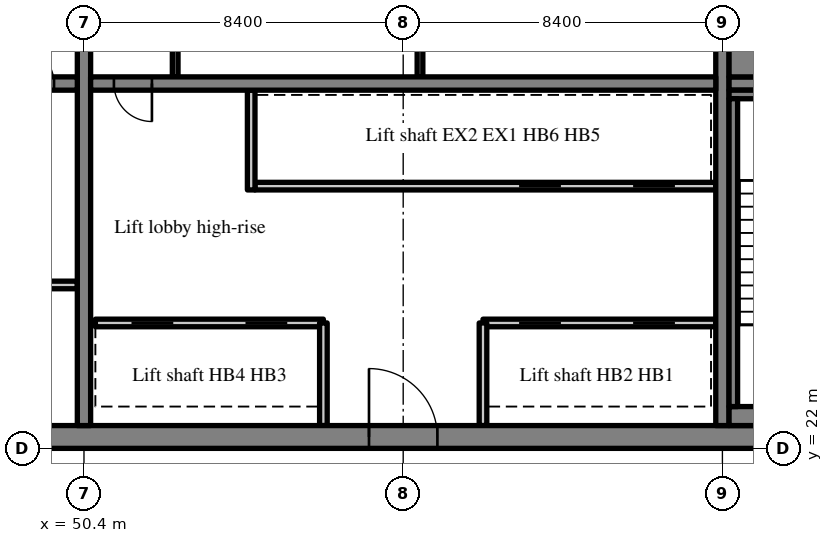
"""IFC4 building model, lengths in metres.
Left out: names, types, materials, properties, quantities, classifications, styles, units other than length and angle.
Written with IfcOpenShell. Run it as: python <this file> out.ifc"""

import sys

from ifc_helpers import new_model, si_unit, direction, frame, frame_2d, origin, place, context, subcontext, project, spatial, rectangle, extrude, source, transform, mapped, element, fill, save


model = new_model("IFC4")
c1 = context("Model", 3, precision=1e-05, world=origin(), true_north=direction((0.0, 1.0)))
c2 = subcontext(c1, "Body", "Model", "MODEL_VIEW")
j1 = project(units=[si_unit("LENGTHUNIT", "METRE"), si_unit("PLANEANGLEUNIT", "RADIAN")], contexts=[c1])
p1 = place(None, origin())
s1 = spatial("IfcSite", under=j1, at=p1, CompositionType="ELEMENT")
p2 = place(p1, origin())
s2 = spatial("IfcBuilding", under=s1, at=p2, CompositionType="ELEMENT")
p3 = place(p2, frame((0.0, 0.0, 253.0)))
s3 = spatial("IfcBuildingStorey", under=s2, at=p3, CompositionType="ELEMENT", Elevation=253.0)
m1 = source(origin(), c2, "Body", "SweptSolid", [
    extrude(rectangle(XDim=50.4, YDim=0.6, at=frame_2d((25.2, 0.0))), origin(), (0.0, 0.0, 1.0), 3.62),
])
p4 = place(p3, frame((25.2, 22.3, 0.0), z_axis=(0.0, 0.0, 1.0), x_axis=(1.0, 0.0, 0.0)))
e1 = element("IfcWall", 1, at=p4, inside=s3, PredefinedType="SHEAR", context=c2, shape_type="MappedRepresentation", body=[
    mapped(m1, transform((0.0, 0.0, 0.0), scale=1.0)),
])
m2 = source(origin(), c2, "Body", "SweptSolid", [
    extrude(rectangle(XDim=1.8, YDim=2.1, at=frame_2d((0.9, 1.05))), frame((0.0, 0.31, 0.0), z_axis=(0.0, -1.0, 0.0), x_axis=(1.0, 0.0, 0.0)), (0.0, 0.0, 1.0), 0.62),
])
p5 = place(p4, frame((15.9, 0.0, 0.0)))
e2 = element("IfcOpeningElement", 2, at=p5, cuts=e1, PredefinedType="OPENING", context=c2, shape_type="MappedRepresentation", body=[
    mapped(m2, transform((0.0, 0.0, 0.0), scale=1.0)),
])
m3 = source(origin(), c2, "Body", "SweptSolid", [
    extrude(rectangle(XDim=0.9, YDim=2.1, at=frame_2d((0.45, 1.05))), frame((0.0, 0.31, 0.0), z_axis=(0.0, -1.0, 0.0), x_axis=(1.0, 0.0, 0.0)), (0.0, 0.0, 1.0), 0.62),
])
p6 = place(p4, frame((21.513, 0.0, 0.0)))
e3 = element("IfcOpeningElement", 3, at=p6, cuts=e1, PredefinedType="OPENING", context=c2, shape_type="MappedRepresentation", body=[
    mapped(m3, transform((0.0, 0.0, 0.0), scale=1.0)),
])
p7 = place(p4, frame((32.7, 0.0, 0.0)))
e4 = element("IfcOpeningElement", 4, at=p7, cuts=e1, PredefinedType="OPENING", context=c2, shape_type="MappedRepresentation", body=[
    mapped(m2, transform((0.0, 0.0, 0.0), scale=1.0)),
])
m4 = source(origin(), c2, "Body", "SweptSolid", [
    extrude(rectangle(XDim=1.2, YDim=2.1, at=frame_2d((0.6, 1.05))), frame((0.0, 0.31, 0.0), z_axis=(0.0, -1.0, 0.0), x_axis=(1.0, 0.0, 0.0)), (0.0, 0.0, 1.0), 0.62),
])
p8 = place(p4, frame((6.488, 0.0, 0.0)))
e5 = element("IfcOpeningElement", 5, at=p8, cuts=e1, PredefinedType="OPENING", context=c2, shape_type="MappedRepresentation", body=[
    mapped(m4, transform((0.0, 0.0, 0.0), scale=1.0)),
])
p9 = place(p4, frame((47.925, 0.0, 0.0)))
e6 = element("IfcOpeningElement", 6, at=p9, cuts=e1, PredefinedType="OPENING", context=c2, shape_type="MappedRepresentation", body=[
    mapped(m4, transform((0.0, 0.0, 0.0), scale=1.0)),
])
m5 = source(origin(), c2, "Body", "SweptSolid", [
    extrude(rectangle(XDim=18.8, YDim=0.35, at=frame_2d((9.4, 0.0))), origin(), (0.0, 0.0, 1.0), 3.62),
])
p10 = place(p3, frame((50.4, 22.6, 0.0), z_axis=(0.0, 0.0, 1.0), x_axis=(0.0, 1.0, 0.0)))
e7 = element("IfcWall", 7, at=p10, inside=s3, PredefinedType="SHEAR", context=c2, shape_type="MappedRepresentation", body=[
    mapped(m5, transform((0.0, 0.0, 0.0), scale=1.0)),
])
m6 = source(origin(), c2, "Body", "SweptSolid", [
    extrude(rectangle(XDim=1.1, YDim=2.1, at=frame_2d((0.55, 1.05))), frame((0.0, 0.185, 0.0), z_axis=(0.0, -1.0, 0.0), x_axis=(1.0, 0.0, 0.0)), (0.0, 0.0, 1.0), 0.37),
])
p11 = place(p10, frame((12.85, 0.0, 0.0)))
e8 = element("IfcOpeningElement", 8, at=p11, cuts=e7, PredefinedType="OPENING", context=c2, shape_type="MappedRepresentation", body=[
    mapped(m6, transform((0.0, 0.0, 0.0), scale=1.0)),
])
p12 = place(p3, frame((67.2, 22.6, 0.0), z_axis=(0.0, 0.0, 1.0), x_axis=(0.0, 1.0, 0.0)))
e9 = element("IfcWall", 9, at=p12, inside=s3, PredefinedType="SHEAR", context=c2, shape_type="MappedRepresentation", body=[
    mapped(m5, transform((0.0, 0.0, 0.0), scale=1.0)),
])
m7 = source(origin(), c2, "Body", "SweptSolid", [
    extrude(rectangle(XDim=16.45, YDim=0.35, at=frame_2d((8.225, 0.0))), origin(), (0.0, 0.0, 1.0), 3.62),
])
p13 = place(p3, frame((33.775, 31.6, 0.0), z_axis=(0.0, 0.0, 1.0), x_axis=(1.0, 0.0, 0.0)))
e10 = element("IfcWall", 10, at=p13, inside=s3, PredefinedType="SHEAR", context=c2, shape_type="MappedRepresentation", body=[
    mapped(m7, transform((0.0, 0.0, 0.0), scale=1.0)),
])
m8 = source(origin(), c2, "Body", "SweptSolid", [
    extrude(rectangle(XDim=1.0, YDim=2.1, at=frame_2d((0.5, 1.05))), frame((0.0, 0.185, 0.0), z_axis=(0.0, -1.0, 0.0), x_axis=(1.0, 0.0, 0.0)), (0.0, 0.0, 1.0), 0.37),
])
p14 = place(p13, frame((14.837, 0.0, 0.0)))
e11 = element("IfcOpeningElement", 11, at=p14, cuts=e10, PredefinedType="OPENING", context=c2, shape_type="MappedRepresentation", body=[
    mapped(m8, transform((0.0, 0.0, 0.0), scale=1.0)),
])
m9 = source(origin(), c2, "Body", "SweptSolid", [
    extrude(rectangle(XDim=16.45, YDim=0.35, at=frame_2d((8.225, 0.0))), origin(), (0.0, 0.0, 1.0), 3.62),
])
p15 = place(p3, frame((50.575, 31.6, 0.0), z_axis=(0.0, 0.0, 1.0), x_axis=(1.0, 0.0, 0.0)))
e12 = element("IfcWall", 12, at=p15, inside=s3, PredefinedType="SHEAR", context=c2, shape_type="MappedRepresentation", body=[
    mapped(m9, transform((0.0, 0.0, 0.0), scale=1.0)),
])
p16 = place(p15, frame((0.613, 0.0, 0.0)))
e13 = element("IfcOpeningElement", 13, at=p16, cuts=e12, PredefinedType="OPENING", context=c2, shape_type="MappedRepresentation", body=[
    mapped(m8, transform((0.0, 0.0, 0.0), scale=1.0)),
])
m10 = source(origin(), c2, "Body", "SweptSolid", [
    extrude(rectangle(XDim=7.625, YDim=0.35, at=frame_2d((3.812, 0.0))), origin(), (0.0, 0.0, 1.0), 3.62),
])
p17 = place(p3, frame((67.375, 31.6, 0.0), z_axis=(0.0, 0.0, 1.0), x_axis=(1.0, 0.0, 0.0)))
e14 = element("IfcWall", 14, at=p17, inside=s3, PredefinedType="SHEAR", context=c2, shape_type="MappedRepresentation", body=[
    mapped(m10, transform((0.0, 0.0, 0.0), scale=1.0)),
])
p18 = place(p17, frame((5.8, 0.0, 0.0)))
e15 = element("IfcOpeningElement", 15, at=p18, cuts=e14, PredefinedType="OPENING", context=c2, shape_type="MappedRepresentation", body=[
    mapped(m6, transform((0.0, 0.0, 0.0), scale=1.0)),
])
m11 = source(origin(), c2, "Body", "SweptSolid", [
    extrude(rectangle(XDim=6.125, YDim=0.2, at=frame_2d((3.062, 0.0))), origin(), (0.0, 0.0, 1.0), 3.62),
])
p19 = place(p3, frame((44.1, 26.3, 0.0), z_axis=(0.0, 0.0, 1.0), x_axis=(1.0, 0.0, 0.0)))
e16 = element("IfcWall", 16, at=p19, inside=s3, PredefinedType="PARTITIONING", context=c2, shape_type="MappedRepresentation", body=[
    mapped(m11, transform((0.0, 0.0, 0.0), scale=1.0)),
])
p20 = place(p3, frame((67.025, 25.3, 0.0), z_axis=(0.0, 0.0, 1.0), x_axis=(-1.0, 0.0, 0.0)))
e17 = element("IfcWall", 17, at=p20, inside=s3, PredefinedType="SOLIDWALL", context=c2, shape_type="MappedRepresentation", body=[
    mapped(m11, transform((0.0, 0.0, 0.0), scale=1.0)),
])
m12 = source(origin(), c2, "Body", "SweptSolid", [
    extrude(rectangle(XDim=1.1, YDim=2.1, at=frame_2d((0.55, 1.05))), frame((0.0, 0.11, 0.0), z_axis=(0.0, -1.0, 0.0), x_axis=(1.0, 0.0, 0.0)), (0.0, 0.0, 1.0), 0.22),
])
p21 = place(p20, frame((1.075, 0.0, 0.0)))
e18 = element("IfcOpeningElement", 18, at=p21, cuts=e17, PredefinedType="OPENING", context=c2, shape_type="MappedRepresentation", body=[
    mapped(m12, transform((0.0, 0.0, 0.0), scale=1.0)),
])
p22 = place(p20, frame((4.075, 0.0, 0.0)))
e19 = element("IfcOpeningElement", 19, at=p22, cuts=e17, PredefinedType="OPENING", context=c2, shape_type="MappedRepresentation", body=[
    mapped(m12, transform((0.0, 0.0, 0.0), scale=1.0)),
])
m13 = source(origin(), c2, "Body", "SweptSolid", [
    extrude(rectangle(XDim=6.0, YDim=0.2, at=frame_2d((3.0, 0.0))), origin(), (0.0, 0.0, 1.0), 3.62),
])
p23 = place(p3, frame((56.7, 25.3, 0.0), z_axis=(0.0, 0.0, 1.0), x_axis=(-1.0, 0.0, 0.0)))
e20 = element("IfcWall", 20, at=p23, inside=s3, PredefinedType="SOLIDWALL", context=c2, shape_type="MappedRepresentation", body=[
    mapped(m13, transform((0.0, 0.0, 0.0), scale=1.0)),
])
p24 = place(p23, frame((0.95, 0.0, 0.0)))
e21 = element("IfcOpeningElement", 21, at=p24, cuts=e20, PredefinedType="OPENING", context=c2, shape_type="MappedRepresentation", body=[
    mapped(m12, transform((0.0, 0.0, 0.0), scale=1.0)),
])
p25 = place(p23, frame((3.95, 0.0, 0.0)))
e22 = element("IfcOpeningElement", 22, at=p25, cuts=e20, PredefinedType="OPENING", context=c2, shape_type="MappedRepresentation", body=[
    mapped(m12, transform((0.0, 0.0, 0.0), scale=1.0)),
])
m14 = source(origin(), c2, "Body", "SweptSolid", [
    extrude(rectangle(XDim=12.125, YDim=0.2, at=frame_2d((6.062, 0.0))), origin(), (0.0, 0.0, 1.0), 3.62),
])
p26 = place(p3, frame((67.025, 28.9, 0.0), z_axis=(0.0, 0.0, 1.0), x_axis=(-1.0, 0.0, 0.0)))
e23 = element("IfcWall", 23, at=p26, inside=s3, PredefinedType="SOLIDWALL", context=c2, shape_type="MappedRepresentation", body=[
    mapped(m14, transform((0.0, 0.0, 0.0), scale=1.0)),
])
p27 = place(p26, frame((1.075, 0.0, 0.0)))
e24 = element("IfcOpeningElement", 24, at=p27, cuts=e23, PredefinedType="OPENING", context=c2, shape_type="MappedRepresentation", body=[
    mapped(m12, transform((0.0, 0.0, 0.0), scale=1.0)),
])
p28 = place(p26, frame((4.075, 0.0, 0.0)))
e25 = element("IfcOpeningElement", 25, at=p28, cuts=e23, PredefinedType="OPENING", context=c2, shape_type="MappedRepresentation", body=[
    mapped(m12, transform((0.0, 0.0, 0.0), scale=1.0)),
])
m15 = source(origin(), c2, "Body", "SweptSolid", [
    extrude(rectangle(XDim=2.7, YDim=0.2, at=frame_2d((1.35, 0.0))), origin(), (0.0, 0.0, 1.0), 3.62),
])
for number, where, z_axis, x_axis in (
    (26, (60.9, 22.6, 0.0), (0.0, 0.0, 1.0), (0.0, 1.0, 0.0)),
    (27, (56.7, 22.6, 0.0), (0.0, 0.0, 1.0), (0.0, 1.0, 0.0)),
):
    element("IfcWall", number, at=place(p3, frame(where, z_axis=z_axis, x_axis=x_axis)), inside=s3, PredefinedType="SOLIDWALL", context=c2, shape_type="MappedRepresentation", body=[
        mapped(m15, transform((0.0, 0.0, 0.0), scale=1.0)),
    ])
m16 = source(origin(), c2, "Body", "SweptSolid", [
    extrude(rectangle(XDim=2.625, YDim=0.2, at=frame_2d((1.312, 0.0))), origin(), (0.0, 0.0, 1.0), 3.62),
])
p29 = place(p3, frame((54.8, 28.8, 0.0), z_axis=(0.0, 0.0, 1.0), x_axis=(0.0, 1.0, 0.0)))
e28 = element("IfcWall", 28, at=p29, inside=s3, PredefinedType="SOLIDWALL", context=c2, shape_type="MappedRepresentation", body=[
    mapped(m16, transform((0.0, 0.0, 0.0), scale=1.0)),
])
m17 = source(origin(), c2, "Body", "SweptSolid", [
    extrude(rectangle(XDim=3.225, YDim=0.15, at=frame_2d((1.613, 0.0))), origin(), (0.0, 0.0, 1.0), 3.62),
])
for number, where, z_axis, x_axis in (
    (29, (52.8, 31.775, 0.0), (0.0, 0.0, 1.0), (0.0, 1.0, 0.0)),
    (30, (59.242, 31.775, 0.0), (0.0, 0.0, 1.0), (0.0, 1.0, 0.0)),
):
    element("IfcWall", number, at=place(p3, frame(where, z_axis=z_axis, x_axis=x_axis)), inside=s3, PredefinedType="PARTITIONING", context=c2, shape_type="MappedRepresentation", body=[
        mapped(m17, transform((0.0, 0.0, 0.0), scale=1.0)),
    ])
m18 = source(origin(), c2, "Body", "SweptSolid", [
    extrude(rectangle(XDim=4.875, YDim=0.5, at=frame_2d((2.438, 0.0))), origin(), (0.0, 0.0, 1.0), 3.62),
])
p30 = place(p3, frame((67.375, 22.85, 0.0), z_axis=(0.0, 0.0, 1.0), x_axis=(1.0, 0.0, 0.0)))
e31 = element("IfcWall", 31, at=p30, inside=s3, PredefinedType="SOLIDWALL", context=c2, shape_type="MappedRepresentation", body=[
    mapped(m18, transform((0.0, 0.0, 0.0), scale=1.0)),
])
m19 = source(origin(), c2, "Body", "SweptSolid", [
    extrude(rectangle(XDim=4.875, YDim=0.225, at=frame_2d((2.438, 0.0))), origin(), (0.0, 0.0, 1.0), 3.62),
])
p31 = place(p3, frame((67.375, 31.312, 0.0), z_axis=(0.0, 0.0, 1.0), x_axis=(1.0, 0.0, 0.0)))
e32 = element("IfcWall", 32, at=p31, inside=s3, PredefinedType="SOLIDWALL", context=c2, shape_type="MappedRepresentation", body=[
    mapped(m19, transform((0.0, 0.0, 0.0), scale=1.0)),
])
m20 = source(origin(), c2, "Body", "SweptSolid", [
    extrude(rectangle(XDim=8.1, YDim=0.225, at=frame_2d((4.05, 0.0))), origin(), (0.0, 0.0, 1.0), 3.62),
])
p32 = place(p3, frame((67.487, 23.1, 0.0), z_axis=(0.0, 0.0, 1.0), x_axis=(0.0, 1.0, 0.0)))
e33 = element("IfcWall", 33, at=p32, inside=s3, PredefinedType="SOLIDWALL", context=c2, shape_type="MappedRepresentation", body=[
    mapped(m20, transform((0.0, 0.0, 0.0), scale=1.0)),
])
m21 = source(origin(), c2, "Body", "SweptSolid", [
    extrude(rectangle(XDim=4.875, YDim=1.025, at=frame_2d((2.438, 0.0))), origin(), (0.0, 0.0, 1.0), 3.62),
])
p33 = place(p3, frame((67.375, 32.287, 0.0), z_axis=(0.0, 0.0, 1.0), x_axis=(1.0, 0.0, 0.0)))
e34 = element("IfcWall", 34, at=p33, inside=s3, PredefinedType="SOLIDWALL", context=c2, shape_type="MappedRepresentation", body=[
    mapped(m21, transform((0.0, 0.0, 0.0), scale=1.0)),
])
m22 = source(origin(), c2, "Body", "SweptSolid", [
    extrude(rectangle(XDim=1.0, YDim=2.1, at=frame_2d((0.5, 1.05))), frame((0.0, 0.025, 0.0), z_axis=(0.0, -1.0, 0.0), x_axis=(1.0, 0.0, 0.0)), (0.0, 0.0, 1.0), 0.05),
])
p34 = place(p14, origin())
e35 = element("IfcDoor", 35, at=p34, inside=s3, OperationType="SINGLE_SWING_LEFT", PredefinedType="DOOR", context=c2, shape_type="MappedRepresentation", body=[
    mapped(m22, transform((0.0, 0.0, 0.0), scale=1.0)),
])
fill(e11, e35)
m23 = source(origin(), c2, "Body", "SweptSolid", [
    extrude(rectangle(XDim=1.8, YDim=2.1, at=frame_2d((0.9, 1.05))), frame((0.0, 0.225, 0.0), z_axis=(0.0, -1.0, 0.0), x_axis=(1.0, 0.0, 0.0)), (0.0, 0.0, 1.0), 0.05),
])
p35 = place(p7, origin())
e36 = element("IfcDoor", 36, at=p35, inside=s3, OperationType="DOUBLE_DOOR_SINGLE_SWING", PredefinedType="DOOR", context=c2, shape_type="MappedRepresentation", body=[
    mapped(m23, transform((0.0, 0.0, 0.0), scale=1.0)),
])
fill(e4, e36)
p36 = place(p16, origin())
e37 = element("IfcDoor", 37, at=p36, inside=s3, OperationType="SINGLE_SWING_RIGHT", PredefinedType="DOOR", context=c2, shape_type="MappedRepresentation", body=[
    mapped(m22, transform((0.0, 0.0, 0.0), scale=1.0)),
])
fill(e13, e37)
m24 = source(origin(), c2, "Body", "SweptSolid", [
    extrude(rectangle(XDim=1.1, YDim=2.1, at=frame_2d((0.55, 1.05))), frame((0.0, 0.025, 0.0), z_axis=(0.0, -1.0, 0.0), x_axis=(1.0, 0.0, 0.0)), (0.0, 0.0, 1.0), 0.05),
])
p37 = place(p21, origin())
e38 = element("IfcDoor", 38, at=p37, inside=s3, OperationType="SLIDING_TO_RIGHT", PredefinedType="DOOR", context=c2, shape_type="MappedRepresentation", body=[
    mapped(m24, transform((0.0, 0.0, 0.0), scale=1.0)),
])
fill(e18, e38)
p38 = place(p22, origin())
e39 = element("IfcDoor", 39, at=p38, inside=s3, OperationType="SLIDING_TO_LEFT", PredefinedType="DOOR", context=c2, shape_type="MappedRepresentation", body=[
    mapped(m24, transform((0.0, 0.0, 0.0), scale=1.0)),
])
fill(e19, e39)
p39 = place(p24, origin())
e40 = element("IfcDoor", 40, at=p39, inside=s3, OperationType="SLIDING_TO_RIGHT", PredefinedType="DOOR", context=c2, shape_type="MappedRepresentation", body=[
    mapped(m24, transform((0.0, 0.0, 0.0), scale=1.0)),
])
fill(e21, e40)
p40 = place(p25, origin())
e41 = element("IfcDoor", 41, at=p40, inside=s3, OperationType="SLIDING_TO_LEFT", PredefinedType="DOOR", context=c2, shape_type="MappedRepresentation", body=[
    mapped(m24, transform((0.0, 0.0, 0.0), scale=1.0)),
])
fill(e22, e41)
p41 = place(p27, origin())
e42 = element("IfcDoor", 42, at=p41, inside=s3, OperationType="SLIDING_TO_RIGHT", PredefinedType="DOOR", context=c2, shape_type="MappedRepresentation", body=[
    mapped(m24, transform((0.0, 0.0, 0.0), scale=1.0)),
])
fill(e24, e42)
p42 = place(p28, origin())
e43 = element("IfcDoor", 43, at=p42, inside=s3, OperationType="SLIDING_TO_LEFT", PredefinedType="DOOR", context=c2, shape_type="MappedRepresentation", body=[
    mapped(m24, transform((0.0, 0.0, 0.0), scale=1.0)),
])
fill(e25, e43)
save(model, sys.argv[1])
